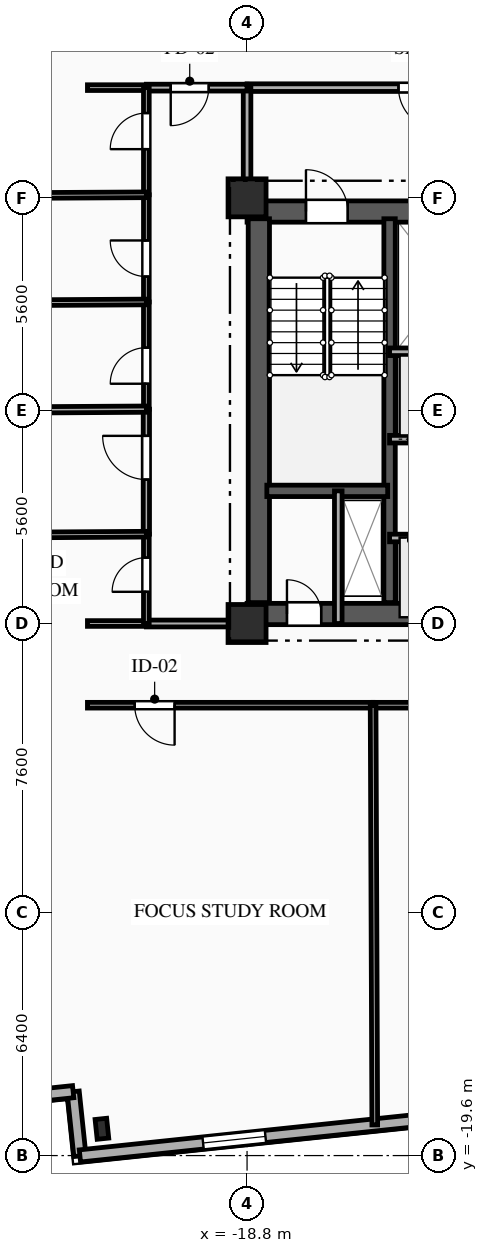
"""IFC4 building model, lengths in metres.
Left out: names, types, materials, properties, quantities, classifications, styles, units other than length and angle.
Written with IfcOpenShell. Run it as: python <this file> out.ifc"""

import sys

from ifc_helpers import new_model, si_unit, direction, frame, frame_2d, origin, origin_2d, place, context, subcontext, project, spatial, rectangle, i_section, extrude, element, fill, save


model = new_model("IFC4")
c1 = context("Model", 3, precision=1e-05, world=origin(), true_north=direction((0.0, 1.0)))
c2 = subcontext(c1, "Body", "Model", "MODEL_VIEW")
j1 = project(units=[si_unit("LENGTHUNIT", "METRE"), si_unit("PLANEANGLEUNIT", "RADIAN")], contexts=[c1])
p1 = place(None, origin())
s1 = spatial("IfcSite", under=j1, at=p1, CompositionType="ELEMENT")
p2 = place(p1, origin())
s2 = spatial("IfcBuilding", under=s1, at=p2, CompositionType="ELEMENT")
p3 = place(p2, frame((0.0, 0.0, 95.75)))
s3 = spatial("IfcBuildingStorey", under=s2, at=p3, CompositionType="ELEMENT", Elevation=95.75)
for number, where, z_axis, x_axis in (
    (1, (-18.8, -5.6, 0.0), (0.0, 0.0, 1.0), (1.0, 0.0, 0.0)),
    (2, (-18.8, 5.6, 0.0), (0.0, 0.0, 1.0), (1.0, 0.0, 0.0)),
):
    element("IfcColumn", number, at=place(p3, frame(where, z_axis=z_axis, x_axis=x_axis)), inside=s3, PredefinedType="COLUMN", context=c2, shape_type="SweptSolid", body=[
        extrude(rectangle(XDim=1.0, YDim=1.0, at=origin_2d()), origin(), (0.0, 0.0, 1.0), 3.35),
    ])
p4 = place(p3, frame((-22.619, -18.895, 0.0), z_axis=(0.0, 0.0, 1.0), x_axis=(0.994521895368, 0.104528463268, 0.0)))
e3 = element("IfcColumn", 3, at=p4, inside=s3, PredefinedType="COLUMN", context=c2, shape_type="SweptSolid", body=[
    extrude(i_section(OverallWidth=0.306, OverallDepth=0.524, WebThickness=0.021, FlangeThickness=0.04, FilletRadius=0.027, at=origin_2d()), origin(), (0.0, 0.0, 1.0), 3.35),
])
for number, where, z_axis, x_axis in (
    (4, (-23.198, -19.609, 0.0), (0.0, 0.0, 1.0), (-0.105, 0.995, 0.0)),
    (5, (-23.376, -17.919, 0.0), (0.0, 0.0, 1.0), (-0.995, -0.105, 0.0)),
):
    element("IfcWall", number, at=place(p3, frame(where, z_axis=z_axis, x_axis=x_axis)), inside=s3, PredefinedType="SOLIDWALL", context=c2, shape_type="SweptSolid", body=[
        extrude(rectangle(XDim=1.7, YDim=0.32, at=frame_2d((0.85, 0.0))), origin(), (0.0, 0.0, 1.0), 3.045),
    ])
p5 = place(p3, frame((-2.015, -17.383, 0.0), z_axis=(0.0, 0.0, 1.0), x_axis=(-0.994521393935, -0.104533233979, 0.0)))
e6 = element("IfcWall", 6, at=p5, inside=s3, PredefinedType="SOLIDWALL", context=c2, shape_type="SweptSolid", body=[
    extrude(rectangle(XDim=21.3, YDim=0.32, at=frame_2d((10.65, 0.0))), origin(), (0.0, 0.0, 1.0), 3.045),
])
p6 = place(p5, frame((1.953, 0.0, 0.85)))
e7 = element("IfcOpeningElement", 7, at=p6, cuts=e6, PredefinedType="OPENING", context=c2, shape_type="SweptSolid", body=[
    extrude(rectangle(XDim=2.4, YDim=1.95, at=frame_2d((1.2, 0.975))), frame((0.0, 0.17, 0.0), z_axis=(0.0, -1.0, 0.0), x_axis=(1.0, 0.0, 0.0)), (0.0, 0.0, 1.0), 0.34),
])
p7 = place(p5, frame((8.944, 0.0, 0.85)))
e8 = element("IfcOpeningElement", 8, at=p7, cuts=e6, PredefinedType="OPENING", context=c2, shape_type="SweptSolid", body=[
    extrude(rectangle(XDim=1.65, YDim=1.85, at=frame_2d((0.825, 0.925))), frame((0.0, 0.17, 0.0), z_axis=(0.0, -1.0, 0.0), x_axis=(1.0, 0.0, 0.0)), (0.0, 0.0, 1.0), 0.34),
])
p8 = place(p5, frame((16.391, 0.0, 0.85)))
e9 = element("IfcOpeningElement", 9, at=p8, cuts=e6, PredefinedType="OPENING", context=c2, shape_type="SweptSolid", body=[
    extrude(rectangle(XDim=1.65, YDim=1.85, at=frame_2d((0.825, 0.925))), frame((0.0, 0.17, 0.0), z_axis=(0.0, -1.0, 0.0), x_axis=(1.0, 0.0, 0.0)), (0.0, 0.0, 1.0), 0.34),
])
p9 = place(p3, frame((-18.8, 5.24, 0.0), z_axis=(0.0, 0.0, 1.0), x_axis=(1.0, 0.0, 0.0)))
e10 = element("IfcWall", 10, at=p9, inside=s3, PredefinedType="SHEAR", context=c2, shape_type="SweptSolid", body=[
    extrude(rectangle(XDim=9.6, YDim=0.56, at=frame_2d((4.8, 0.0))), origin(), (0.0, 0.0, 1.0), 3.045),
])
p10 = place(p9, frame((1.55, 0.0, 0.0)))
e11 = element("IfcOpeningElement", 11, at=p10, cuts=e10, PredefinedType="OPENING", context=c2, shape_type="SweptSolid", body=[
    extrude(rectangle(XDim=1.1, YDim=2.15, at=frame_2d((0.55, 1.075))), frame((0.0, 0.29, 0.0), z_axis=(0.0, -1.0, 0.0), x_axis=(1.0, 0.0, 0.0)), (0.0, 0.0, 1.0), 0.58),
])
p11 = place(p9, frame((4.775, 0.0, 0.0)))
e12 = element("IfcOpeningElement", 12, at=p11, cuts=e10, PredefinedType="OPENING", context=c2, shape_type="SweptSolid", body=[
    extrude(rectangle(XDim=1.05, YDim=2.1, at=frame_2d((0.525, 1.05))), frame((0.0, 0.29, 0.0), z_axis=(0.0, -1.0, 0.0), x_axis=(1.0, 0.0, 0.0)), (0.0, 0.0, 1.0), 0.58),
])
p12 = place(p3, frame((-18.8, -5.35, 0.0), z_axis=(0.0, 0.0, 1.0), x_axis=(1.0, 0.0, 0.0)))
e13 = element("IfcWall", 13, at=p12, inside=s3, PredefinedType="SHEAR", context=c2, shape_type="SweptSolid", body=[
    extrude(rectangle(XDim=9.6, YDim=0.56, at=frame_2d((4.8, 0.0))), origin(), (0.0, 0.0, 1.0), 3.045),
])
p13 = place(p12, frame((1.05, 0.0, 0.0)))
e14 = element("IfcOpeningElement", 14, at=p13, cuts=e13, PredefinedType="OPENING", context=c2, shape_type="SweptSolid", body=[
    extrude(rectangle(XDim=0.9, YDim=2.1, at=frame_2d((0.45, 1.05))), frame((0.0, 0.29, 0.0), z_axis=(0.0, -1.0, 0.0), x_axis=(1.0, 0.0, 0.0)), (0.0, 0.0, 1.0), 0.58),
])
p14 = place(p3, frame((-18.49, -5.05, 0.0), z_axis=(0.0, 0.0, 1.0), x_axis=(0.0, 1.0, 0.0)))
e15 = element("IfcWall", 15, at=p14, inside=s3, PredefinedType="SHEAR", context=c2, shape_type="SweptSolid", body=[
    extrude(rectangle(XDim=10.1, YDim=0.56, at=frame_2d((5.05, 0.0))), origin(), (0.0, 0.0, 1.0), 3.045),
])
p15 = place(p3, frame((-15.05, -5.05, 0.0), z_axis=(0.0, 0.0, 1.0), x_axis=(0.0, 1.0, 0.0)))
e16 = element("IfcWall", 16, at=p15, inside=s3, PredefinedType="SHEAR", context=c2, shape_type="SweptSolid", body=[
    extrude(rectangle(XDim=10.1, YDim=0.3, at=frame_2d((5.05, 0.0))), origin(), (0.0, 0.0, 1.0), 3.045),
])
p16 = place(p3, frame((-18.28, -2.11, 0.0), z_axis=(0.0, 0.0, 1.0), x_axis=(1.0, 0.0, 0.0)))
e17 = element("IfcWall", 17, at=p16, inside=s3, PredefinedType="SHEAR", context=c2, shape_type="SweptSolid", body=[
    extrude(rectangle(XDim=3.18, YDim=0.3, at=frame_2d((1.59, 0.0))), origin(), (0.0, 0.0, 1.0), 3.045),
])
p17 = place(p3, frame((-16.4, -5.6, 0.0), z_axis=(0.0, 0.0, 1.0), x_axis=(0.0, 1.0, 0.0)))
e18 = element("IfcWall", 18, at=p17, inside=s3, PredefinedType="PARTITIONING", context=c2, shape_type="SweptSolid", body=[
    extrude(rectangle(XDim=3.49, YDim=0.2, at=frame_2d((1.745, 0.0))), origin(), (0.0, 0.0, 1.0), 3.045),
])
p18 = place(p3, frame((-12.0, 8.5, 0.0), z_axis=(0.0, 0.0, 1.0), x_axis=(-1.0, 0.0, 0.0)))
e19 = element("IfcWall", 19, at=p18, inside=s3, PredefinedType="PARTITIONING", context=c2, shape_type="SweptSolid", body=[
    extrude(rectangle(XDim=6.8, YDim=0.2, at=frame_2d((3.4, 0.0))), origin(), (0.0, 0.0, 1.0), 3.045),
])
p19 = place(p18, frame((1.715, 0.0, 0.0)))
e20 = element("IfcOpeningElement", 20, at=p19, cuts=e19, PredefinedType="OPENING", context=c2, shape_type="SweptSolid", body=[
    extrude(rectangle(XDim=1.1, YDim=2.15, at=frame_2d((0.55, 1.075))), frame((0.0, 0.11, 0.0), z_axis=(0.0, -1.0, 0.0), x_axis=(1.0, 0.0, 0.0)), (0.0, 0.0, 1.0), 0.22),
])
p20 = place(p3, frame((-18.8, 8.5, 0.0), z_axis=(0.0, 0.0, 1.0), x_axis=(0.0, -1.0, 0.0)))
e21 = element("IfcWall", 21, at=p20, inside=s3, PredefinedType="PARTITIONING", context=c2, shape_type="SweptSolid", body=[
    extrude(rectangle(XDim=2.9, YDim=0.2, at=frame_2d((1.45, 0.0))), origin(), (0.0, 0.0, 1.0), 2.53),
])
p21 = place(p3, frame((-15.05, -3.35, 0.0), z_axis=(0.0, 0.0, 1.0), x_axis=(1.0, 0.0, 0.0)))
e22 = element("IfcWall", 22, at=p21, inside=s3, PredefinedType="PARTITIONING", context=c2, shape_type="SweptSolid", body=[
    extrude(rectangle(XDim=2.03, YDim=0.2, at=frame_2d((1.015, 0.0))), origin(), (0.0, 0.0, 1.0), 3.045),
])
p22 = place(p21, frame((0.49, 0.0, 0.0)))
e23 = element("IfcOpeningElement", 23, at=p22, cuts=e22, PredefinedType="OPENING", context=c2, shape_type="SweptSolid", body=[
    extrude(rectangle(XDim=1.05, YDim=2.1, at=frame_2d((0.525, 1.05))), frame((0.0, 0.11, 0.0), z_axis=(0.0, -1.0, 0.0), x_axis=(1.0, 0.0, 0.0)), (0.0, 0.0, 1.0), 0.22),
])
p23 = place(p3, frame((-13.02, -0.75, 0.0), z_axis=(0.0, 0.0, 1.0), x_axis=(-1.0, 0.0, 0.0)))
e24 = element("IfcWall", 24, at=p23, inside=s3, PredefinedType="PARTITIONING", context=c2, shape_type="SweptSolid", body=[
    extrude(rectangle(XDim=2.03, YDim=0.2, at=frame_2d((1.015, 0.0))), origin(), (0.0, 0.0, 1.0), 3.045),
])
p24 = place(p23, frame((0.49, 0.0, 0.0)))
e25 = element("IfcOpeningElement", 25, at=p24, cuts=e24, PredefinedType="OPENING", context=c2, shape_type="SweptSolid", body=[
    extrude(rectangle(XDim=1.05, YDim=2.1, at=frame_2d((0.525, 1.05))), frame((0.0, 0.11, 0.0), z_axis=(0.0, -1.0, 0.0), x_axis=(1.0, 0.0, 0.0)), (0.0, 0.0, 1.0), 0.22),
])
p25 = place(p3, frame((-18.8, 8.5, 0.0), z_axis=(0.0, 0.0, 1.0), x_axis=(-1.0, 0.0, 0.0)))
e26 = element("IfcWall", 26, at=p25, inside=s3, PredefinedType="PARTITIONING", context=c2, shape_type="SweptSolid", body=[
    extrude(rectangle(XDim=2.65, YDim=0.18, at=frame_2d((1.325, 0.0))), origin(), (0.0, 0.0, 1.0), 3.045),
])
p26 = place(p25, frame((1.009, 0.0, 0.0)))
e27 = element("IfcOpeningElement", 27, at=p26, cuts=e26, PredefinedType="OPENING", context=c2, shape_type="SweptSolid", body=[
    extrude(rectangle(XDim=1.0, YDim=2.15, at=frame_2d((0.5, 1.075))), frame((0.0, 0.1, 0.0), z_axis=(0.0, -1.0, 0.0), x_axis=(1.0, 0.0, 0.0)), (0.0, 0.0, 1.0), 0.2),
])
p27 = place(p3, frame((-21.45, 8.5, 0.0), z_axis=(0.0, 0.0, 1.0), x_axis=(-1.0, 0.0, 0.0)))
e28 = element("IfcWall", 28, at=p27, inside=s3, PredefinedType="PARTITIONING", context=c2, shape_type="SweptSolid", body=[
    extrude(rectangle(XDim=1.55, YDim=0.15, at=frame_2d((0.775, 0.0))), origin(), (0.0, 0.0, 1.0), 3.045),
])
p28 = place(p3, frame((-21.45, -5.6, 0.0), z_axis=(0.0, 0.0, 1.0), x_axis=(1.0, 0.0, 0.0)))
e29 = element("IfcWall", 29, at=p28, inside=s3, PredefinedType="PARTITIONING", context=c2, shape_type="SweptSolid", body=[
    extrude(rectangle(XDim=2.65, YDim=0.18, at=frame_2d((1.325, 0.0))), origin(), (0.0, 0.0, 1.0), 3.045),
])
p29 = place(p3, frame((-23.0, -5.6, 0.0), z_axis=(0.0, 0.0, 1.0), x_axis=(1.0, 0.0, 0.0)))
e30 = element("IfcWall", 30, at=p29, inside=s3, PredefinedType="PLUMBINGWALL", context=c2, shape_type="SweptSolid", body=[
    extrude(rectangle(XDim=1.55, YDim=0.15, at=frame_2d((0.775, 0.0))), origin(), (0.0, 0.0, 1.0), 3.045),
])
p30 = place(p3, frame((-15.483, -7.75, 0.0), z_axis=(0.0, 0.0, 1.0), x_axis=(-1.0, 0.0, 0.0)))
e31 = element("IfcWall", 31, at=p30, inside=s3, PredefinedType="PARTITIONING", context=c2, shape_type="SweptSolid", body=[
    extrude(rectangle(XDim=7.517, YDim=0.15, at=frame_2d((3.758, 0.0))), origin(), (0.0, 0.0, 1.0), 3.045),
])
p31 = place(p30, frame((5.223, 0.0, 0.0)))
e32 = element("IfcOpeningElement", 32, at=p31, cuts=e31, PredefinedType="OPENING", context=c2, shape_type="SweptSolid", body=[
    extrude(rectangle(XDim=1.05, YDim=2.15, at=frame_2d((0.525, 1.075))), frame((0.0, 0.085, 0.0), z_axis=(0.0, -1.0, 0.0), x_axis=(1.0, 0.0, 0.0)), (0.0, 0.0, 1.0), 0.17),
])
p32 = place(p3, frame((-7.967, -7.75, 0.0), z_axis=(0.0, 0.0, 1.0), x_axis=(-1.0, 0.0, 0.0)))
e33 = element("IfcWall", 33, at=p32, inside=s3, PredefinedType="PARTITIONING", context=c2, shape_type="SweptSolid", body=[
    extrude(rectangle(XDim=7.516, YDim=0.15, at=frame_2d((3.758, 0.0))), origin(), (0.0, 0.0, 1.0), 3.045),
])
p33 = place(p32, frame((5.223, 0.0, 0.0)))
e34 = element("IfcOpeningElement", 34, at=p33, cuts=e33, PredefinedType="OPENING", context=c2, shape_type="SweptSolid", body=[
    extrude(rectangle(XDim=1.05, YDim=2.15, at=frame_2d((0.525, 1.075))), frame((0.0, 0.085, 0.0), z_axis=(0.0, -1.0, 0.0), x_axis=(1.0, 0.0, 0.0)), (0.0, 0.0, 1.0), 0.17),
])
p34 = place(p3, frame((-21.45, -5.6, 0.0), z_axis=(0.0, 0.0, 1.0), x_axis=(0.0, 1.0, 0.0)))
e35 = element("IfcWall", 35, at=p34, inside=s3, PredefinedType="PLUMBINGWALL", context=c2, shape_type="SweptSolid", body=[
    extrude(rectangle(XDim=2.35, YDim=0.15, at=frame_2d((1.175, 0.0))), origin(), (0.0, 0.0, 1.0), 3.045),
])
p35 = place(p34, frame((0.834, 0.0, 0.0)))
e36 = element("IfcOpeningElement", 36, at=p35, cuts=e35, PredefinedType="OPENING", context=c2, shape_type="SweptSolid", body=[
    extrude(rectangle(XDim=0.9, YDim=2.1, at=frame_2d((0.45, 1.05))), frame((0.0, 0.085, 0.0), z_axis=(0.0, -1.0, 0.0), x_axis=(1.0, 0.0, 0.0)), (0.0, 0.0, 1.0), 0.17),
])
p36 = place(p3, frame((-21.45, -3.25, 0.0), z_axis=(0.0, 0.0, 1.0), x_axis=(0.0, 1.0, 0.0)))
e37 = element("IfcWall", 37, at=p36, inside=s3, PredefinedType="PARTITIONING", context=c2, shape_type="SweptSolid", body=[
    extrude(rectangle(XDim=3.29, YDim=0.165, at=frame_2d((1.645, 0.0))), origin(), (0.0, 0.0, 1.0), 3.045),
])
p37 = place(p36, frame((1.438, 0.0, 0.0)))
e38 = element("IfcOpeningElement", 38, at=p37, cuts=e37, PredefinedType="OPENING", context=c2, shape_type="SweptSolid", body=[
    extrude(rectangle(XDim=1.15, YDim=2.15, at=frame_2d((0.575, 1.075))), frame((0.0, 0.093, 0.0), z_axis=(0.0, -1.0, 0.0), x_axis=(1.0, 0.0, 0.0)), (0.0, 0.0, 1.0), 0.185),
])
p38 = place(p3, frame((-21.45, 0.04, 0.0), z_axis=(0.0, 0.0, 1.0), x_axis=(0.0, 1.0, 0.0)))
e39 = element("IfcWall", 39, at=p38, inside=s3, PredefinedType="PARTITIONING", context=c2, shape_type="SweptSolid", body=[
    extrude(rectangle(XDim=2.82, YDim=0.15, at=frame_2d((1.41, 0.0))), origin(), (0.0, 0.0, 1.0), 3.045),
])
p39 = place(p38, frame((0.669, 0.0, 0.0)))
e40 = element("IfcOpeningElement", 40, at=p39, cuts=e39, PredefinedType="OPENING", context=c2, shape_type="SweptSolid", body=[
    extrude(rectangle(XDim=0.95, YDim=2.1, at=frame_2d((0.475, 1.05))), frame((0.0, 0.085, 0.0), z_axis=(0.0, -1.0, 0.0), x_axis=(1.0, 0.0, 0.0)), (0.0, 0.0, 1.0), 0.17),
])
p40 = place(p3, frame((-21.45, 2.86, 0.0), z_axis=(0.0, 0.0, 1.0), x_axis=(0.0, 1.0, 0.0)))
e41 = element("IfcWall", 41, at=p40, inside=s3, PredefinedType="PARTITIONING", context=c2, shape_type="SweptSolid", body=[
    extrude(rectangle(XDim=2.82, YDim=0.15, at=frame_2d((1.41, 0.0))), origin(), (0.0, 0.0, 1.0), 3.045),
])
p41 = place(p40, frame((0.669, 0.0, 0.0)))
e42 = element("IfcOpeningElement", 42, at=p41, cuts=e41, PredefinedType="OPENING", context=c2, shape_type="SweptSolid", body=[
    extrude(rectangle(XDim=0.95, YDim=2.1, at=frame_2d((0.475, 1.05))), frame((0.0, 0.085, 0.0), z_axis=(0.0, -1.0, 0.0), x_axis=(1.0, 0.0, 0.0)), (0.0, 0.0, 1.0), 0.17),
])
p42 = place(p3, frame((-21.45, 5.68, 0.0), z_axis=(0.0, 0.0, 1.0), x_axis=(0.0, 1.0, 0.0)))
e43 = element("IfcWall", 43, at=p42, inside=s3, PredefinedType="PARTITIONING", context=c2, shape_type="SweptSolid", body=[
    extrude(rectangle(XDim=2.82, YDim=0.15, at=frame_2d((1.41, 0.0))), origin(), (0.0, 0.0, 1.0), 3.045),
])
p43 = place(p42, frame((1.201, 0.0, 0.0)))
e44 = element("IfcOpeningElement", 44, at=p43, cuts=e43, PredefinedType="OPENING", context=c2, shape_type="SweptSolid", body=[
    extrude(rectangle(XDim=0.95, YDim=2.1, at=frame_2d((0.475, 1.05))), frame((0.0, 0.085, 0.0), z_axis=(0.0, -1.0, 0.0), x_axis=(1.0, 0.0, 0.0)), (0.0, 0.0, 1.0), 0.17),
])
p44 = place(p3, frame((-28.332, -3.294, 0.0), z_axis=(0.0, 0.0, 1.0), x_axis=(0.99997961062, 0.006385792383, 0.0)))
e45 = element("IfcWall", 45, at=p44, inside=s3, PredefinedType="PLUMBINGWALL", context=c2, shape_type="SweptSolid", body=[
    extrude(rectangle(XDim=6.882, YDim=0.15, at=frame_2d((3.441, 0.0))), origin(), (0.0, 0.0, 1.0), 3.045),
])
p45 = place(p3, frame((-28.677, -0.004, 0.0), z_axis=(0.0, 0.0, 1.0), x_axis=(0.999981514486, 0.006080352417, 0.0)))
e46 = element("IfcWall", 46, at=p45, inside=s3, PredefinedType="PARTITIONING", context=c2, shape_type="SweptSolid", body=[
    extrude(rectangle(XDim=7.228, YDim=0.165, at=frame_2d((3.614, 0.0))), origin(), (0.0, 0.0, 1.0), 3.045),
])
p46 = place(p3, frame((-28.974, 2.816, 0.0), z_axis=(0.0, 0.0, 1.0), x_axis=(0.999982942193, 0.00584083232, 0.0)))
e47 = element("IfcWall", 47, at=p46, inside=s3, PredefinedType="PARTITIONING", context=c2, shape_type="SweptSolid", body=[
    extrude(rectangle(XDim=7.524, YDim=0.15, at=frame_2d((3.762, 0.0))), origin(), (0.0, 0.0, 1.0), 2.53),
])
p47 = place(p3, frame((-29.27, 5.636, 0.0), z_axis=(0.0, 0.0, 1.0), x_axis=(0.999984210669, 0.005619467326, 0.0)))
e48 = element("IfcWall", 48, at=p47, inside=s3, PredefinedType="PARTITIONING", context=c2, shape_type="SweptSolid", body=[
    extrude(rectangle(XDim=7.82, YDim=0.15, at=frame_2d((3.91, 0.0))), origin(), (0.0, 0.0, 1.0), 3.045),
])
p48 = place(p3, frame((-15.483, -7.75, 0.0), z_axis=(0.0, 0.0, 1.0), x_axis=(0.003956994399, -0.999992171067, 0.0)))
e49 = element("IfcWall", 49, at=p48, inside=s3, PredefinedType="PARTITIONING", context=c2, shape_type="SweptSolid", body=[
    extrude(rectangle(XDim=11.044, YDim=0.15, at=frame_2d((5.522, 0.0))), origin(), (0.0, 0.0, 1.0), 3.045),
])
p49 = place(p3, frame((-15.05, 1.55, 0.0), z_axis=(0.0, 0.0, 1.0), x_axis=(1.0, 0.0, 0.0)))
e50 = element("IfcWall", 50, at=p49, inside=s3, PredefinedType="PARTITIONING", context=c2, shape_type="SweptSolid", body=[
    extrude(rectangle(XDim=5.85, YDim=0.2, at=frame_2d((2.925, 0.0))), origin(), (0.0, 0.0, 1.0), 3.045),
])
p50 = place(p8, origin())
e51 = element("IfcWindow", 51, at=p50, inside=s3, PartitioningType="SINGLE_PANEL", PredefinedType="WINDOW", context=c2, shape_type="SweptSolid", body=[
    extrude(rectangle(XDim=1.65, YDim=1.85, at=frame_2d((0.825, 0.925))), frame((0.0, 0.03, 0.0), z_axis=(0.0, -1.0, 0.0), x_axis=(1.0, 0.0, 0.0)), (0.0, 0.0, 1.0), 0.06),
])
fill(e9, e51)
p51 = place(p10, origin())
e52 = element("IfcDoor", 52, at=p51, inside=s3, OperationType="SINGLE_SWING_LEFT", PredefinedType="DOOR", context=c2, shape_type="SweptSolid", body=[
    extrude(rectangle(XDim=1.1, YDim=2.15, at=frame_2d((0.55, 1.075))), frame((0.0, 0.025, 0.0), z_axis=(0.0, -1.0, 0.0), x_axis=(1.0, 0.0, 0.0)), (0.0, 0.0, 1.0), 0.05),
])
fill(e11, e52)
p52 = place(p13, origin())
e53 = element("IfcDoor", 53, at=p52, inside=s3, OperationType="SINGLE_SWING_LEFT", PredefinedType="DOOR", context=c2, shape_type="SweptSolid", body=[
    extrude(rectangle(XDim=0.9, YDim=2.1, at=frame_2d((0.45, 1.05))), frame((0.0, 0.025, 0.0), z_axis=(0.0, -1.0, 0.0), x_axis=(1.0, 0.0, 0.0)), (0.0, 0.0, 1.0), 0.05),
])
fill(e14, e53)
p53 = place(p19, origin())
e54 = element("IfcDoor", 54, at=p53, inside=s3, OperationType="SINGLE_SWING_LEFT", PredefinedType="DOOR", context=c2, shape_type="SweptSolid", body=[
    extrude(rectangle(XDim=1.1, YDim=2.15, at=frame_2d((0.55, 1.075))), frame((0.0, 0.025, 0.0), z_axis=(0.0, -1.0, 0.0), x_axis=(1.0, 0.0, 0.0)), (0.0, 0.0, 1.0), 0.05),
])
fill(e20, e54)
p54 = place(p22, origin())
e55 = element("IfcDoor", 55, at=p54, inside=s3, OperationType="DOUBLE_DOOR_SLIDING", PredefinedType="DOOR", context=c2, shape_type="SweptSolid", body=[
    extrude(rectangle(XDim=1.05, YDim=2.1, at=frame_2d((0.525, 1.05))), frame((0.0, 0.025, 0.0), z_axis=(0.0, -1.0, 0.0), x_axis=(1.0, 0.0, 0.0)), (0.0, 0.0, 1.0), 0.05),
])
fill(e23, e55)
p55 = place(p24, origin())
e56 = element("IfcDoor", 56, at=p55, inside=s3, OperationType="DOUBLE_DOOR_SLIDING", PredefinedType="DOOR", context=c2, shape_type="SweptSolid", body=[
    extrude(rectangle(XDim=1.05, YDim=2.1, at=frame_2d((0.525, 1.05))), frame((0.0, 0.025, 0.0), z_axis=(0.0, -1.0, 0.0), x_axis=(1.0, 0.0, 0.0)), (0.0, 0.0, 1.0), 0.05),
])
fill(e25, e56)
p56 = place(p26, origin())
e57 = element("IfcDoor", 57, at=p56, inside=s3, OperationType="SINGLE_SWING_RIGHT", PredefinedType="DOOR", context=c2, shape_type="SweptSolid", body=[
    extrude(rectangle(XDim=1.0, YDim=2.15, at=frame_2d((0.5, 1.075))), frame((0.0, 0.025, 0.0), z_axis=(0.0, -1.0, 0.0), x_axis=(1.0, 0.0, 0.0)), (0.0, 0.0, 1.0), 0.05),
])
fill(e27, e57)
p57 = place(p31, origin())
e58 = element("IfcDoor", 58, at=p57, inside=s3, OperationType="SINGLE_SWING_LEFT", PredefinedType="DOOR", context=c2, shape_type="SweptSolid", body=[
    extrude(rectangle(XDim=1.05, YDim=2.15, at=frame_2d((0.525, 1.075))), frame((0.0, 0.025, 0.0), z_axis=(0.0, -1.0, 0.0), x_axis=(1.0, 0.0, 0.0)), (0.0, 0.0, 1.0), 0.05),
])
fill(e32, e58)
p58 = place(p35, origin())
e59 = element("IfcDoor", 59, at=p58, inside=s3, OperationType="SINGLE_SWING_LEFT", PredefinedType="DOOR", context=c2, shape_type="SweptSolid", body=[
    extrude(rectangle(XDim=0.9, YDim=2.1, at=frame_2d((0.45, 1.05))), frame((0.0, 0.025, 0.0), z_axis=(0.0, -1.0, 0.0), x_axis=(1.0, 0.0, 0.0)), (0.0, 0.0, 1.0), 0.05),
])
fill(e36, e59)
p59 = place(p37, origin())
e60 = element("IfcDoor", 60, at=p59, inside=s3, OperationType="SINGLE_SWING_RIGHT", PredefinedType="DOOR", context=c2, shape_type="SweptSolid", body=[
    extrude(rectangle(XDim=1.15, YDim=2.15, at=frame_2d((0.575, 1.075))), frame((0.0, 0.025, 0.0), z_axis=(0.0, -1.0, 0.0), x_axis=(1.0, 0.0, 0.0)), (0.0, 0.0, 1.0), 0.05),
])
fill(e38, e60)
p60 = place(p39, origin())
e61 = element("IfcDoor", 61, at=p60, inside=s3, OperationType="SINGLE_SWING_LEFT", PredefinedType="DOOR", context=c2, shape_type="SweptSolid", body=[
    extrude(rectangle(XDim=0.95, YDim=2.1, at=frame_2d((0.475, 1.05))), frame((0.0, 0.025, 0.0), z_axis=(0.0, -1.0, 0.0), x_axis=(1.0, 0.0, 0.0)), (0.0, 0.0, 1.0), 0.05),
])
fill(e40, e61)
p61 = place(p41, origin())
e62 = element("IfcDoor", 62, at=p61, inside=s3, OperationType="SINGLE_SWING_RIGHT", PredefinedType="DOOR", context=c2, shape_type="SweptSolid", body=[
    extrude(rectangle(XDim=0.95, YDim=2.1, at=frame_2d((0.475, 1.05))), frame((0.0, 0.025, 0.0), z_axis=(0.0, -1.0, 0.0), x_axis=(1.0, 0.0, 0.0)), (0.0, 0.0, 1.0), 0.05),
])
fill(e42, e62)
p62 = place(p43, origin())
e63 = element("IfcDoor", 63, at=p62, inside=s3, OperationType="SINGLE_SWING_LEFT", PredefinedType="DOOR", context=c2, shape_type="SweptSolid", body=[
    extrude(rectangle(XDim=0.95, YDim=2.1, at=frame_2d((0.475, 1.05))), frame((0.0, 0.025, 0.0), z_axis=(0.0, -1.0, 0.0), x_axis=(1.0, 0.0, 0.0)), (0.0, 0.0, 1.0), 0.05),
])
fill(e44, e63)
save(model, sys.argv[1])
